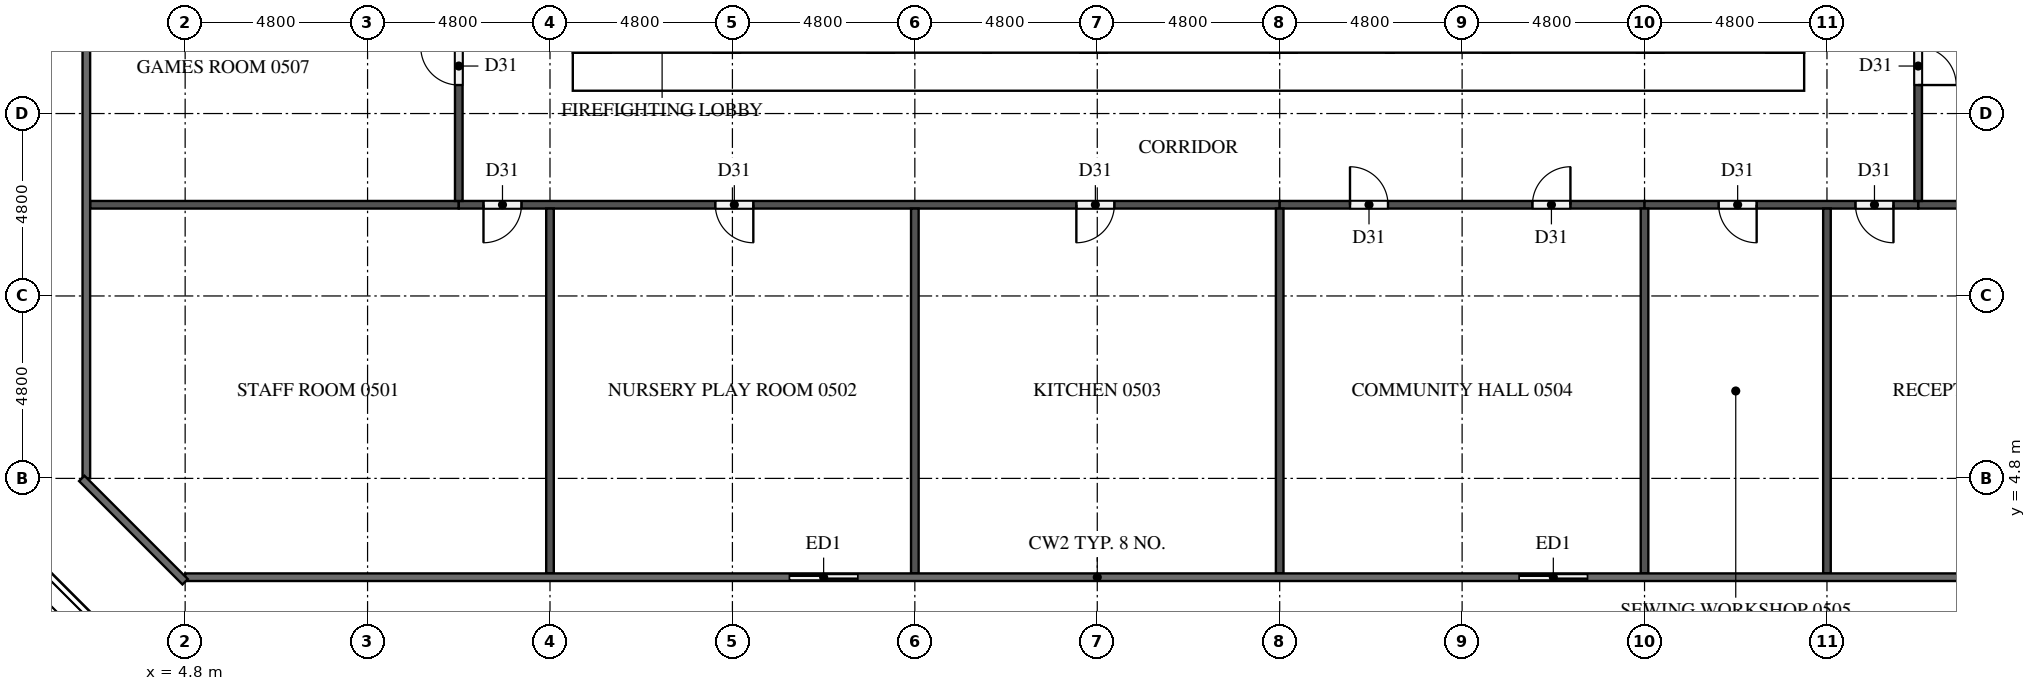
"""IFC4 building model, lengths in metres.
Left out: names, types, materials, properties, quantities, classifications, styles, units other than length and angle.
Written with IfcOpenShell. Run it as: python <this file> out.ifc"""

import sys

from ifc_helpers import new_model, si_unit, direction, frame, frame_2d, origin, place, context, subcontext, project, spatial, rectangle, extrude, element, fill, save


model = new_model("IFC4")
c1 = context("Model", 3, precision=1e-05, world=origin(), true_north=direction((0.0, 1.0)))
c2 = subcontext(c1, "Body", "Model", "MODEL_VIEW")
j1 = project(units=[si_unit("LENGTHUNIT", "METRE"), si_unit("PLANEANGLEUNIT", "RADIAN")], contexts=[c1])
p1 = place(None, origin())
s1 = spatial("IfcSite", under=j1, at=p1, CompositionType="ELEMENT")
p2 = place(p1, origin())
s2 = spatial("IfcBuilding", under=s1, at=p2, CompositionType="ELEMENT")
p3 = place(p2, frame((0.0, 0.0, 24.0)))
s3 = spatial("IfcBuildingStorey", under=s2, at=p3, CompositionType="ELEMENT", Elevation=24.0)
p4 = place(p3, frame((15.0, 15.5, 0.0), z_axis=(0.0, 0.0, 1.0), x_axis=(1.0, 0.0, 0.0)))
e1 = element("IfcWall", 1, at=p4, inside=s3, PredefinedType="SHEAR", context=c2, shape_type="SweptSolid", body=[
    extrude(rectangle(XDim=32.4, YDim=1.0, at=frame_2d((16.2, 0.0))), origin(), (0.0, 0.0, 1.0), 5.1),
])
p5 = place(p4, frame((15.3, 0.0, 0.0)))
e2 = element("IfcOpeningElement", 2, at=p5, cuts=e1, PredefinedType="OPENING", context=c2, shape_type="SweptSolid", body=[
    extrude(rectangle(XDim=1.8, YDim=2.1, at=frame_2d((0.9, 1.05))), frame((0.0, 0.51, 0.0), z_axis=(0.0, -1.0, 0.0), x_axis=(1.0, 0.0, 0.0)), (0.0, 0.0, 1.0), 1.02),
])
p6 = place(p3, frame((15.5, 16.0, 0.0), z_axis=(0.0, 0.0, 1.0), x_axis=(0.0, 1.0, 0.0)))
e3 = element("IfcWall", 3, at=p6, inside=s3, PredefinedType="SHEAR", context=c2, shape_type="SweptSolid", body=[
    extrude(rectangle(XDim=20.8, YDim=1.0, at=frame_2d((10.4, 0.0))), origin(), (0.0, 0.0, 1.0), 5.1),
])
p7 = place(p6, frame((4.76, 0.0, 0.0)))
e4 = element("IfcOpeningElement", 4, at=p7, cuts=e3, PredefinedType="OPENING", context=c2, shape_type="SweptSolid", body=[
    extrude(rectangle(XDim=1.2, YDim=2.1, at=frame_2d((0.6, 1.05))), frame((0.0, 0.51, 0.0), z_axis=(0.0, -1.0, 0.0), x_axis=(1.0, 0.0, 0.0)), (0.0, 0.0, 1.0), 1.02),
])
p8 = place(p3, frame((46.9, 16.0, 0.0), z_axis=(0.0, 0.0, 1.0), x_axis=(0.0, 1.0, 0.0)))
e5 = element("IfcWall", 5, at=p8, inside=s3, PredefinedType="SHEAR", context=c2, shape_type="SweptSolid", body=[
    extrude(rectangle(XDim=20.8, YDim=1.0, at=frame_2d((10.4, 0.0))), origin(), (0.0, 0.0, 1.0), 5.1),
])
p9 = place(p8, frame((10.1, 0.0, 0.0)))
e6 = element("IfcOpeningElement", 6, at=p9, cuts=e5, PredefinedType="OPENING", context=c2, shape_type="SweptSolid", body=[
    extrude(rectangle(XDim=1.2, YDim=2.1, at=frame_2d((0.6, 1.05))), frame((0.0, 0.51, 0.0), z_axis=(0.0, -1.0, 0.0), x_axis=(1.0, 0.0, 0.0)), (0.0, 0.0, 1.0), 1.02),
])
p10 = place(p3, frame((23.1, 16.0, 0.0), z_axis=(0.0, 0.0, 1.0), x_axis=(0.0, 1.0, 0.0)))
e7 = element("IfcWall", 7, at=p10, inside=s3, PredefinedType="SHEAR", context=c2, shape_type="SweptSolid", body=[
    extrude(rectangle(XDim=20.8, YDim=0.7, at=frame_2d((10.4, 0.0))), origin(), (0.0, 0.0, 1.0), 5.1),
])
p11 = place(p3, frame((20.4, 2.2, 0.0), z_axis=(0.0, 0.0, 1.0), x_axis=(1.0, 0.0, 0.0)))
e8 = element("IfcWall", 8, at=p11, inside=s3, PredefinedType="SOLIDWALL", context=c2, shape_type="SweptSolid", body=[
    extrude(rectangle(XDim=2.4, YDim=0.15, at=frame_2d((1.2, 0.0))), origin(), (0.0, 0.0, 1.0), 5.1),
])
p12 = place(p11, frame((0.3, 0.0, 0.0)))
e9 = element("IfcOpeningElement", 9, at=p12, cuts=e8, PredefinedType="OPENING", context=c2, shape_type="SweptSolid", body=[
    extrude(rectangle(XDim=1.8, YDim=2.4, at=frame_2d((0.9, 1.2))), frame((0.0, 0.085, 0.0), z_axis=(0.0, -1.0, 0.0), x_axis=(1.0, 0.0, 0.0)), (0.0, 0.0, 1.0), 0.17),
])
p13 = place(p3, frame((39.6, 2.2, 0.0), z_axis=(0.0, 0.0, 1.0), x_axis=(1.0, 0.0, 0.0)))
e10 = element("IfcWall", 10, at=p13, inside=s3, PredefinedType="SOLIDWALL", context=c2, shape_type="SweptSolid", body=[
    extrude(rectangle(XDim=2.4, YDim=0.15, at=frame_2d((1.2, 0.0))), origin(), (0.0, 0.0, 1.0), 5.1),
])
p14 = place(p13, frame((0.3, 0.0, 0.0)))
e11 = element("IfcOpeningElement", 11, at=p14, cuts=e10, PredefinedType="OPENING", context=c2, shape_type="SweptSolid", body=[
    extrude(rectangle(XDim=1.8, YDim=2.4, at=frame_2d((0.9, 1.2))), frame((0.0, 0.085, 0.0), z_axis=(0.0, -1.0, 0.0), x_axis=(1.0, 0.0, 0.0)), (0.0, 0.0, 1.0), 0.17),
])
p15 = place(p3, frame((2.3, 12.0, 0.0), z_axis=(0.0, 0.0, 1.0), x_axis=(1.0, 0.0, 0.0)))
e12 = element("IfcWall", 12, at=p15, inside=s3, PredefinedType="PARTITIONING", context=c2, shape_type="SweptSolid", body=[
    extrude(rectangle(XDim=9.7, YDim=0.2, at=frame_2d((4.85, 0.0))), origin(), (0.0, 0.0, 1.0), 5.1),
])
p16 = place(p3, frame((50.4, 12.0, 0.0), z_axis=(0.0, 0.0, 1.0), x_axis=(1.0, 0.0, 0.0)))
e13 = element("IfcWall", 13, at=p16, inside=s3, PredefinedType="PARTITIONING", context=c2, shape_type="SweptSolid", body=[
    extrude(rectangle(XDim=4.9, YDim=0.2, at=frame_2d((2.45, 0.0))), origin(), (0.0, 0.0, 1.0), 5.1),
])
p17 = place(p3, frame((33.6, 12.0, 0.0), z_axis=(0.0, 0.0, 1.0), x_axis=(-1.0, 0.0, 0.0)))
e14 = element("IfcWall", 14, at=p17, inside=s3, PredefinedType="PARTITIONING", context=c2, shape_type="SweptSolid", body=[
    extrude(rectangle(XDim=21.6, YDim=0.2, at=frame_2d((10.8, 0.0))), origin(), (0.0, 0.0, 1.0), 5.1),
])
p18 = place(p17, frame((19.95, 0.0, 0.0)))
e15 = element("IfcOpeningElement", 15, at=p18, cuts=e14, PredefinedType="OPENING", context=c2, shape_type="SweptSolid", body=[
    extrude(rectangle(XDim=1.0, YDim=2.1, at=frame_2d((0.5, 1.05))), frame((0.0, 0.11, 0.0), z_axis=(0.0, -1.0, 0.0), x_axis=(1.0, 0.0, 0.0)), (0.0, 0.0, 1.0), 0.22),
])
p19 = place(p17, frame((13.85, 0.0, 0.0)))
e16 = element("IfcOpeningElement", 16, at=p19, cuts=e14, PredefinedType="OPENING", context=c2, shape_type="SweptSolid", body=[
    extrude(rectangle(XDim=1.0, YDim=2.1, at=frame_2d((0.5, 1.05))), frame((0.0, 0.11, 0.0), z_axis=(0.0, -1.0, 0.0), x_axis=(1.0, 0.0, 0.0)), (0.0, 0.0, 1.0), 0.22),
])
p20 = place(p17, frame((4.35, 0.0, 0.0)))
e17 = element("IfcOpeningElement", 17, at=p20, cuts=e14, PredefinedType="OPENING", context=c2, shape_type="SweptSolid", body=[
    extrude(rectangle(XDim=1.0, YDim=2.1, at=frame_2d((0.5, 1.05))), frame((0.0, 0.11, 0.0), z_axis=(0.0, -1.0, 0.0), x_axis=(1.0, 0.0, 0.0)), (0.0, 0.0, 1.0), 0.22),
])
p21 = place(p3, frame((33.6, 12.0, 0.0), z_axis=(0.0, 0.0, 1.0), x_axis=(1.0, 0.0, 0.0)))
e18 = element("IfcWall", 18, at=p21, inside=s3, PredefinedType="PARTITIONING", context=c2, shape_type="SweptSolid", body=[
    extrude(rectangle(XDim=9.6, YDim=0.2, at=frame_2d((4.8, 0.0))), origin(), (0.0, 0.0, 1.0), 5.1),
])
p22 = place(p21, frame((6.65, 0.0, 0.0)))
e19 = element("IfcOpeningElement", 19, at=p22, cuts=e18, PredefinedType="OPENING", context=c2, shape_type="SweptSolid", body=[
    extrude(rectangle(XDim=1.0, YDim=2.1, at=frame_2d((0.5, 1.05))), frame((0.0, 0.11, 0.0), z_axis=(0.0, -1.0, 0.0), x_axis=(1.0, 0.0, 0.0)), (0.0, 0.0, 1.0), 0.22),
])
p23 = place(p21, frame((1.85, 0.0, 0.0)))
e20 = element("IfcOpeningElement", 20, at=p23, cuts=e18, PredefinedType="OPENING", context=c2, shape_type="SweptSolid", body=[
    extrude(rectangle(XDim=1.0, YDim=2.1, at=frame_2d((0.5, 1.05))), frame((0.0, 0.11, 0.0), z_axis=(0.0, -1.0, 0.0), x_axis=(1.0, 0.0, 0.0)), (0.0, 0.0, 1.0), 0.22),
])
p24 = place(p3, frame((50.4, 12.0, 0.0), z_axis=(0.0, 0.0, 1.0), x_axis=(-1.0, 0.0, 0.0)))
e21 = element("IfcWall", 21, at=p24, inside=s3, PredefinedType="PARTITIONING", context=c2, shape_type="SweptSolid", body=[
    extrude(rectangle(XDim=7.2, YDim=0.2, at=frame_2d((3.6, 0.0))), origin(), (0.0, 0.0, 1.0), 5.1),
])
p25 = place(p24, frame((4.25, 0.0, 0.0)))
e22 = element("IfcOpeningElement", 22, at=p25, cuts=e21, PredefinedType="OPENING", context=c2, shape_type="SweptSolid", body=[
    extrude(rectangle(XDim=1.0, YDim=2.1, at=frame_2d((0.5, 1.05))), frame((0.0, 0.11, 0.0), z_axis=(0.0, -1.0, 0.0), x_axis=(1.0, 0.0, 0.0)), (0.0, 0.0, 1.0), 0.22),
])
p26 = place(p24, frame((0.65, 0.0, 0.0)))
e23 = element("IfcOpeningElement", 23, at=p26, cuts=e21, PredefinedType="OPENING", context=c2, shape_type="SweptSolid", body=[
    extrude(rectangle(XDim=1.0, YDim=2.1, at=frame_2d((0.5, 1.05))), frame((0.0, 0.11, 0.0), z_axis=(0.0, -1.0, 0.0), x_axis=(1.0, 0.0, 0.0)), (0.0, 0.0, 1.0), 0.22),
])
p27 = place(p3, frame((12.0, 12.1, 0.0), z_axis=(0.0, 0.0, 1.0), x_axis=(0.0, 1.0, 0.0)))
e24 = element("IfcWall", 24, at=p27, inside=s3, PredefinedType="PARTITIONING", context=c2, shape_type="SweptSolid", body=[
    extrude(rectangle(XDim=28.6, YDim=0.2, at=frame_2d((14.3, 0.0))), origin(), (0.0, 0.0, 1.0), 5.1),
])
p28 = place(p27, frame((3.05, 0.0, 0.0)))
e25 = element("IfcOpeningElement", 25, at=p28, cuts=e24, PredefinedType="OPENING", context=c2, shape_type="SweptSolid", body=[
    extrude(rectangle(XDim=1.0, YDim=2.1, at=frame_2d((0.5, 1.05))), frame((0.0, 0.11, 0.0), z_axis=(0.0, -1.0, 0.0), x_axis=(1.0, 0.0, 0.0)), (0.0, 0.0, 1.0), 0.22),
])
p29 = place(p27, frame((9.05, 0.0, 0.0)))
e26 = element("IfcOpeningElement", 26, at=p29, cuts=e24, PredefinedType="OPENING", context=c2, shape_type="SweptSolid", body=[
    extrude(rectangle(XDim=1.0, YDim=2.1, at=frame_2d((0.5, 1.05))), frame((0.0, 0.11, 0.0), z_axis=(0.0, -1.0, 0.0), x_axis=(1.0, 0.0, 0.0)), (0.0, 0.0, 1.0), 0.22),
])
p30 = place(p27, frame((13.85, 0.0, 0.0)))
e27 = element("IfcOpeningElement", 27, at=p30, cuts=e24, PredefinedType="OPENING", context=c2, shape_type="SweptSolid", body=[
    extrude(rectangle(XDim=1.0, YDim=2.1, at=frame_2d((0.5, 1.05))), frame((0.0, 0.11, 0.0), z_axis=(0.0, -1.0, 0.0), x_axis=(1.0, 0.0, 0.0)), (0.0, 0.0, 1.0), 0.22),
])
p31 = place(p27, frame((18.65, 0.0, 0.0)))
e28 = element("IfcOpeningElement", 28, at=p31, cuts=e24, PredefinedType="OPENING", context=c2, shape_type="SweptSolid", body=[
    extrude(rectangle(XDim=1.0, YDim=2.1, at=frame_2d((0.5, 1.05))), frame((0.0, 0.11, 0.0), z_axis=(0.0, -1.0, 0.0), x_axis=(1.0, 0.0, 0.0)), (0.0, 0.0, 1.0), 0.22),
])
p32 = place(p27, frame((24.55, 0.0, 0.0)))
e29 = element("IfcOpeningElement", 29, at=p32, cuts=e24, PredefinedType="OPENING", context=c2, shape_type="SweptSolid", body=[
    extrude(rectangle(XDim=1.0, YDim=2.1, at=frame_2d((0.5, 1.05))), frame((0.0, 0.11, 0.0), z_axis=(0.0, -1.0, 0.0), x_axis=(1.0, 0.0, 0.0)), (0.0, 0.0, 1.0), 0.22),
])
for number, where, z_axis, x_axis in (
    (30, (14.4, 2.3, 0.0), (0.0, 0.0, 1.0), (0.0, 1.0, 0.0)),
    (31, (24.0, 2.3, 0.0), (0.0, 0.0, 1.0), (0.0, 1.0, 0.0)),
    (32, (33.6, 2.3, 0.0), (0.0, 0.0, 1.0), (0.0, 1.0, 0.0)),
    (33, (43.2, 2.3, 0.0), (0.0, 0.0, 1.0), (0.0, 1.0, 0.0)),
    (34, (48.0, 2.3, 0.0), (0.0, 0.0, 1.0), (0.0, 1.0, 0.0)),
):
    element("IfcWall", number, at=place(p3, frame(where, z_axis=z_axis, x_axis=x_axis)), inside=s3, PredefinedType="PARTITIONING", context=c2, shape_type="SweptSolid", body=[
        extrude(rectangle(XDim=9.6, YDim=0.2, at=frame_2d((4.8, 0.0))), origin(), (0.0, 0.0, 1.0), 5.1),
    ])
p33 = place(p3, frame((50.4, 40.7, 0.0), z_axis=(0.0, 0.0, 1.0), x_axis=(0.0, -1.0, 0.0)))
e35 = element("IfcWall", 35, at=p33, inside=s3, PredefinedType="PARTITIONING", context=c2, shape_type="SweptSolid", body=[
    extrude(rectangle(XDim=28.6, YDim=0.2, at=frame_2d((14.3, 0.0))), origin(), (0.0, 0.0, 1.0), 5.1),
])
p34 = place(p33, frame((24.55, 0.0, 0.0)))
e36 = element("IfcOpeningElement", 36, at=p34, cuts=e35, PredefinedType="OPENING", context=c2, shape_type="SweptSolid", body=[
    extrude(rectangle(XDim=1.0, YDim=2.1, at=frame_2d((0.5, 1.05))), frame((0.0, 0.11, 0.0), z_axis=(0.0, -1.0, 0.0), x_axis=(1.0, 0.0, 0.0)), (0.0, 0.0, 1.0), 0.22),
])
p35 = place(p33, frame((18.65, 0.0, 0.0)))
e37 = element("IfcOpeningElement", 37, at=p35, cuts=e35, PredefinedType="OPENING", context=c2, shape_type="SweptSolid", body=[
    extrude(rectangle(XDim=1.0, YDim=2.1, at=frame_2d((0.5, 1.05))), frame((0.0, 0.11, 0.0), z_axis=(0.0, -1.0, 0.0), x_axis=(1.0, 0.0, 0.0)), (0.0, 0.0, 1.0), 0.22),
])
p36 = place(p33, frame((13.85, 0.0, 0.0)))
e38 = element("IfcOpeningElement", 38, at=p36, cuts=e35, PredefinedType="OPENING", context=c2, shape_type="SweptSolid", body=[
    extrude(rectangle(XDim=1.0, YDim=2.1, at=frame_2d((0.5, 1.05))), frame((0.0, 0.11, 0.0), z_axis=(0.0, -1.0, 0.0), x_axis=(1.0, 0.0, 0.0)), (0.0, 0.0, 1.0), 0.22),
])
p37 = place(p33, frame((9.05, 0.0, 0.0)))
e39 = element("IfcOpeningElement", 39, at=p37, cuts=e35, PredefinedType="OPENING", context=c2, shape_type="SweptSolid", body=[
    extrude(rectangle(XDim=1.0, YDim=2.1, at=frame_2d((0.5, 1.05))), frame((0.0, 0.11, 0.0), z_axis=(0.0, -1.0, 0.0), x_axis=(1.0, 0.0, 0.0)), (0.0, 0.0, 1.0), 0.22),
])
p38 = place(p33, frame((3.05, 0.0, 0.0)))
e40 = element("IfcOpeningElement", 40, at=p38, cuts=e35, PredefinedType="OPENING", context=c2, shape_type="SweptSolid", body=[
    extrude(rectangle(XDim=1.0, YDim=2.1, at=frame_2d((0.5, 1.05))), frame((0.0, 0.11, 0.0), z_axis=(0.0, -1.0, 0.0), x_axis=(1.0, 0.0, 0.0)), (0.0, 0.0, 1.0), 0.22),
])
p39 = place(p12, origin())
e41 = element("IfcDoor", 41, at=p39, inside=s3, OperationType="SLIDING_TO_LEFT", PredefinedType="DOOR", context=c2, shape_type="SweptSolid", body=[
    extrude(rectangle(XDim=1.8, YDim=2.4, at=frame_2d((0.9, 1.2))), frame((0.0, 0.025, 0.0), z_axis=(0.0, -1.0, 0.0), x_axis=(1.0, 0.0, 0.0)), (0.0, 0.0, 1.0), 0.05),
])
fill(e9, e41)
p40 = place(p14, origin())
e42 = element("IfcDoor", 42, at=p40, inside=s3, OperationType="SLIDING_TO_RIGHT", PredefinedType="DOOR", context=c2, shape_type="SweptSolid", body=[
    extrude(rectangle(XDim=1.8, YDim=2.4, at=frame_2d((0.9, 1.2))), frame((0.0, 0.025, 0.0), z_axis=(0.0, -1.0, 0.0), x_axis=(1.0, 0.0, 0.0)), (0.0, 0.0, 1.0), 0.05),
])
fill(e11, e42)
p41 = place(p5, frame((1.8, 0.0, 0.0), z_axis=(0.0, 0.0, 1.0), x_axis=(-1.0, 0.0, 0.0)))
e43 = element("IfcDoor", 43, at=p41, inside=s3, OperationType="DOUBLE_DOOR_SINGLE_SWING", PredefinedType="DOOR", context=c2, shape_type="SweptSolid", body=[
    extrude(rectangle(XDim=1.8, YDim=2.1, at=frame_2d((0.9, 1.05))), frame((0.0, 0.025, 0.0), z_axis=(0.0, -1.0, 0.0), x_axis=(1.0, 0.0, 0.0)), (0.0, 0.0, 1.0), 0.05),
])
fill(e2, e43)
p42 = place(p18, origin())
e44 = element("IfcDoor", 44, at=p42, inside=s3, OperationType="SINGLE_SWING_RIGHT", PredefinedType="DOOR", context=c2, shape_type="SweptSolid", body=[
    extrude(rectangle(XDim=1.0, YDim=2.1, at=frame_2d((0.5, 1.05))), frame((0.0, 0.025, 0.0), z_axis=(0.0, -1.0, 0.0), x_axis=(1.0, 0.0, 0.0)), (0.0, 0.0, 1.0), 0.05),
])
fill(e15, e44)
p43 = place(p19, origin())
e45 = element("IfcDoor", 45, at=p43, inside=s3, OperationType="SINGLE_SWING_LEFT", PredefinedType="DOOR", context=c2, shape_type="SweptSolid", body=[
    extrude(rectangle(XDim=1.0, YDim=2.1, at=frame_2d((0.5, 1.05))), frame((0.0, 0.025, 0.0), z_axis=(0.0, -1.0, 0.0), x_axis=(1.0, 0.0, 0.0)), (0.0, 0.0, 1.0), 0.05),
])
fill(e16, e45)
p44 = place(p20, origin())
e46 = element("IfcDoor", 46, at=p44, inside=s3, OperationType="SINGLE_SWING_RIGHT", PredefinedType="DOOR", context=c2, shape_type="SweptSolid", body=[
    extrude(rectangle(XDim=1.0, YDim=2.1, at=frame_2d((0.5, 1.05))), frame((0.0, 0.025, 0.0), z_axis=(0.0, -1.0, 0.0), x_axis=(1.0, 0.0, 0.0)), (0.0, 0.0, 1.0), 0.05),
])
fill(e17, e46)
p45 = place(p22, origin())
e47 = element("IfcDoor", 47, at=p45, inside=s3, OperationType="SINGLE_SWING_RIGHT", PredefinedType="DOOR", context=c2, shape_type="SweptSolid", body=[
    extrude(rectangle(XDim=1.0, YDim=2.1, at=frame_2d((0.5, 1.05))), frame((0.0, 0.025, 0.0), z_axis=(0.0, -1.0, 0.0), x_axis=(1.0, 0.0, 0.0)), (0.0, 0.0, 1.0), 0.05),
])
fill(e19, e47)
p46 = place(p23, origin())
e48 = element("IfcDoor", 48, at=p46, inside=s3, OperationType="SINGLE_SWING_LEFT", PredefinedType="DOOR", context=c2, shape_type="SweptSolid", body=[
    extrude(rectangle(XDim=1.0, YDim=2.1, at=frame_2d((0.5, 1.05))), frame((0.0, 0.025, 0.0), z_axis=(0.0, -1.0, 0.0), x_axis=(1.0, 0.0, 0.0)), (0.0, 0.0, 1.0), 0.05),
])
fill(e20, e48)
p47 = place(p25, origin())
e49 = element("IfcDoor", 49, at=p47, inside=s3, OperationType="SINGLE_SWING_LEFT", PredefinedType="DOOR", context=c2, shape_type="SweptSolid", body=[
    extrude(rectangle(XDim=1.0, YDim=2.1, at=frame_2d((0.5, 1.05))), frame((0.0, 0.025, 0.0), z_axis=(0.0, -1.0, 0.0), x_axis=(1.0, 0.0, 0.0)), (0.0, 0.0, 1.0), 0.05),
])
fill(e22, e49)
p48 = place(p26, origin())
e50 = element("IfcDoor", 50, at=p48, inside=s3, OperationType="SINGLE_SWING_LEFT", PredefinedType="DOOR", context=c2, shape_type="SweptSolid", body=[
    extrude(rectangle(XDim=1.0, YDim=2.1, at=frame_2d((0.5, 1.05))), frame((0.0, 0.025, 0.0), z_axis=(0.0, -1.0, 0.0), x_axis=(1.0, 0.0, 0.0)), (0.0, 0.0, 1.0), 0.05),
])
fill(e23, e50)
p49 = place(p28, origin())
e51 = element("IfcDoor", 51, at=p49, inside=s3, OperationType="SINGLE_SWING_RIGHT", PredefinedType="DOOR", context=c2, shape_type="SweptSolid", body=[
    extrude(rectangle(XDim=1.0, YDim=2.1, at=frame_2d((0.5, 1.05))), frame((0.0, 0.025, 0.0), z_axis=(0.0, -1.0, 0.0), x_axis=(1.0, 0.0, 0.0)), (0.0, 0.0, 1.0), 0.05),
])
fill(e25, e51)
p50 = place(p34, origin())
e52 = element("IfcDoor", 52, at=p50, inside=s3, OperationType="SINGLE_SWING_RIGHT", PredefinedType="DOOR", context=c2, shape_type="SweptSolid", body=[
    extrude(rectangle(XDim=1.0, YDim=2.1, at=frame_2d((0.5, 1.05))), frame((0.0, 0.025, 0.0), z_axis=(0.0, -1.0, 0.0), x_axis=(1.0, 0.0, 0.0)), (0.0, 0.0, 1.0), 0.05),
])
fill(e36, e52)
save(model, sys.argv[1])
